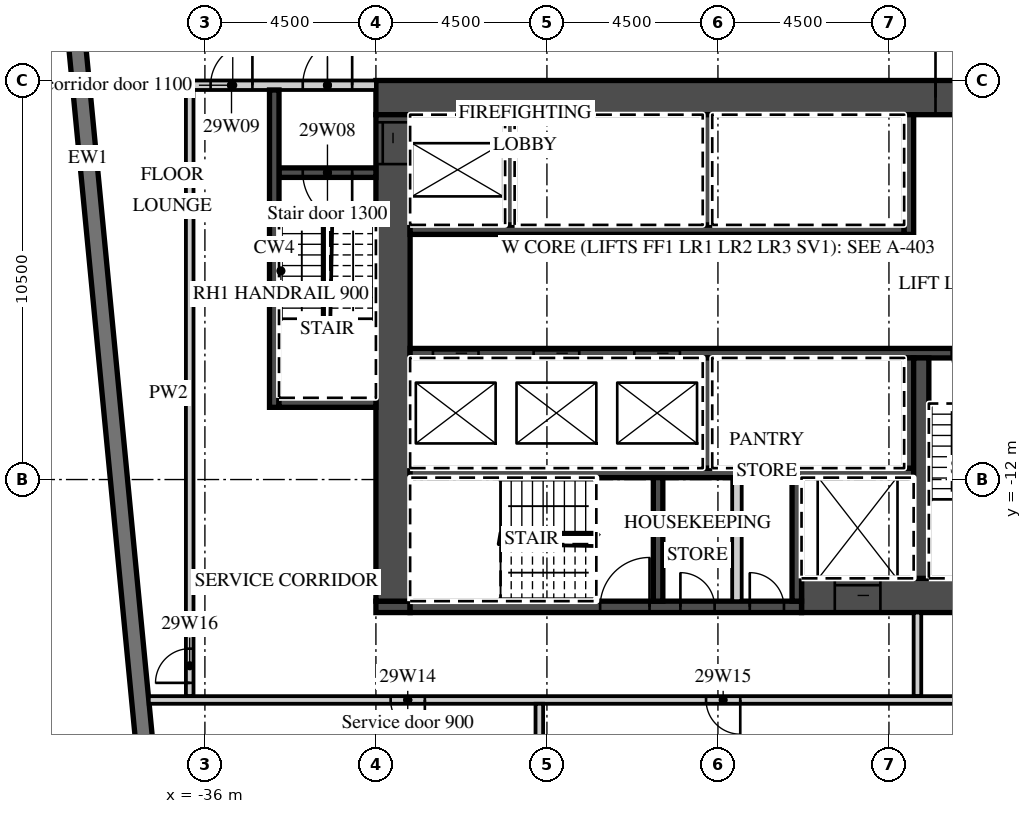
"""IFC4 building model, lengths in metres.
Left out: names, types, materials, properties, quantities, classifications, styles, units other than length and angle.
Written with IfcOpenShell. Run it as: python <this file> out.ifc"""

import sys

from ifc_helpers import new_model, si_unit, direction, frame, frame_2d, origin, place, context, subcontext, project, spatial, rectangle, extrude, element, fill, save


model = new_model("IFC4")
c1 = context("Model", 3, precision=1e-05, world=origin(), true_north=direction((0.0, 1.0)))
c2 = subcontext(c1, "Body", "Model", "MODEL_VIEW")
j1 = project(units=[si_unit("LENGTHUNIT", "METRE"), si_unit("PLANEANGLEUNIT", "RADIAN")], contexts=[c1])
p1 = place(None, origin())
s1 = spatial("IfcSite", under=j1, at=p1, CompositionType="ELEMENT")
p2 = place(p1, origin())
s2 = spatial("IfcBuilding", under=s1, at=p2, CompositionType="ELEMENT")
p3 = place(p2, frame((0.0, 0.0, 130.6)))
s3 = spatial("IfcBuildingStorey", under=s2, at=p3, CompositionType="ELEMENT", Elevation=130.6)
p4 = place(p3, frame((-40.753, 13.872, 0.0), z_axis=(0.0, 0.0, 1.0), x_axis=(0.095843327381, -0.995396431878, 0.0)))
e1 = element("IfcWall", 1, at=p4, inside=s3, PredefinedType="SOLIDWALL", context=c2, shape_type="SweptSolid", body=[
    extrude(rectangle(XDim=35.0, YDim=0.45, at=frame_2d((17.5, 0.0))), origin(), (0.0, 0.0, 1.0), 3.02),
])
p5 = place(p4, frame((4.277, 0.0, 0.45)))
e2 = element("IfcOpeningElement", 2, at=p5, cuts=e1, PredefinedType="OPENING", context=c2, shape_type="SweptSolid", body=[
    extrude(rectangle(XDim=3.3, YDim=2.25, at=frame_2d((1.65, 1.125))), frame((0.0, 0.235, 0.0), z_axis=(0.0, -1.0, 0.0), x_axis=(1.0, 0.0, 0.0)), (0.0, 0.0, 1.0), 0.47),
])
p6 = place(p4, frame((8.798, 0.0, 0.45)))
e3 = element("IfcOpeningElement", 3, at=p6, cuts=e1, PredefinedType="OPENING", context=c2, shape_type="SweptSolid", body=[
    extrude(rectangle(XDim=3.3, YDim=2.25, at=frame_2d((1.65, 1.125))), frame((0.0, 0.235, 0.0), z_axis=(0.0, -1.0, 0.0), x_axis=(1.0, 0.0, 0.0)), (0.0, 0.0, 1.0), 0.47),
])
p7 = place(p3, frame((-31.5, -1.95, 0.0), z_axis=(0.0, 0.0, 1.0), x_axis=(1.0, 0.0, 0.0)))
e4 = element("IfcWall", 4, at=p7, inside=s3, PredefinedType="SHEAR", context=c2, shape_type="SweptSolid", body=[
    extrude(rectangle(XDim=18.0, YDim=0.9, at=frame_2d((9.0, 0.0))), origin(), (0.0, 0.0, 1.0), 3.02),
])
p8 = place(p7, frame((14.725, 0.0, 0.0)))
e5 = element("IfcOpeningElement", 5, at=p8, cuts=e4, PredefinedType="OPENING", context=c2, shape_type="SweptSolid", body=[
    extrude(rectangle(XDim=1.8, YDim=2.1, at=frame_2d((0.9, 1.05))), frame((0.0, 0.46, 0.0), z_axis=(0.0, -1.0, 0.0), x_axis=(1.0, 0.0, 0.0)), (0.0, 0.0, 1.0), 0.92),
])
p9 = place(p3, frame((-20.3, -15.05, 0.0), z_axis=(0.0, 0.0, 1.0), x_axis=(1.0, 0.0, 0.0)))
e6 = element("IfcWall", 6, at=p9, inside=s3, PredefinedType="SHEAR", context=c2, shape_type="SweptSolid", body=[
    extrude(rectangle(XDim=6.8, YDim=0.9, at=frame_2d((3.4, 0.0))), origin(), (0.0, 0.0, 1.0), 3.02),
])
p10 = place(p9, frame((0.875, 0.0, 0.0)))
e7 = element("IfcOpeningElement", 7, at=p10, cuts=e6, PredefinedType="OPENING", context=c2, shape_type="SweptSolid", body=[
    extrude(rectangle(XDim=1.2, YDim=2.1, at=frame_2d((0.6, 1.05))), frame((0.0, 0.46, 0.0), z_axis=(0.0, -1.0, 0.0), x_axis=(1.0, 0.0, 0.0)), (0.0, 0.0, 1.0), 0.92),
])
p11 = place(p3, frame((-31.5, -15.35, 0.0), z_axis=(0.0, 0.0, 1.0), x_axis=(1.0, 0.0, 0.0)))
e8 = element("IfcWall", 8, at=p11, inside=s3, PredefinedType="SHEAR", context=c2, shape_type="SweptSolid", body=[
    extrude(rectangle(XDim=0.9, YDim=0.3, at=frame_2d((0.45, 0.0))), origin(), (0.0, 0.0, 1.0), 3.02),
])
p12 = place(p3, frame((-30.6, -15.35, 0.0), z_axis=(0.0, 0.0, 1.0), x_axis=(1.0, 0.0, 0.0)))
e9 = element("IfcWall", 9, at=p12, inside=s3, PredefinedType="SHEAR", context=c2, shape_type="SweptSolid", body=[
    extrude(rectangle(XDim=10.3, YDim=0.3, at=frame_2d((5.15, 0.0))), origin(), (0.0, 0.0, 1.0), 3.02),
])
p13 = place(p12, frame((5.0, 0.0, 0.0)))
e10 = element("IfcOpeningElement", 10, at=p13, cuts=e9, PredefinedType="OPENING", context=c2, shape_type="SweptSolid", body=[
    extrude(rectangle(XDim=1.3, YDim=2.1, at=frame_2d((0.65, 1.05))), frame((0.0, 0.16, 0.0), z_axis=(0.0, -1.0, 0.0), x_axis=(1.0, 0.0, 0.0)), (0.0, 0.0, 1.0), 0.32),
])
p14 = place(p12, frame((7.113, 0.0, 0.0)))
e11 = element("IfcOpeningElement", 11, at=p14, cuts=e9, PredefinedType="OPENING", context=c2, shape_type="SweptSolid", body=[
    extrude(rectangle(XDim=0.9, YDim=2.1, at=frame_2d((0.45, 1.05))), frame((0.0, 0.16, 0.0), z_axis=(0.0, -1.0, 0.0), x_axis=(1.0, 0.0, 0.0)), (0.0, 0.0, 1.0), 0.32),
])
p15 = place(p12, frame((8.938, 0.0, 0.0)))
e12 = element("IfcOpeningElement", 12, at=p15, cuts=e9, PredefinedType="OPENING", context=c2, shape_type="SweptSolid", body=[
    extrude(rectangle(XDim=0.9, YDim=2.1, at=frame_2d((0.45, 1.05))), frame((0.0, 0.16, 0.0), z_axis=(0.0, -1.0, 0.0), x_axis=(1.0, 0.0, 0.0)), (0.0, 0.0, 1.0), 0.32),
])
p16 = place(p3, frame((-31.05, -15.2, 0.0), z_axis=(0.0, 0.0, 1.0), x_axis=(0.0, 1.0, 0.0)))
e13 = element("IfcWall", 13, at=p16, inside=s3, PredefinedType="SHEAR", context=c2, shape_type="SweptSolid", body=[
    extrude(rectangle(XDim=12.8, YDim=0.9, at=frame_2d((6.4, 0.0))), origin(), (0.0, 0.0, 1.0), 3.02),
])
p17 = place(p16, frame((11.5, 0.0, 0.0)))
e14 = element("IfcOpeningElement", 14, at=p17, cuts=e13, PredefinedType="OPENING", context=c2, shape_type="SweptSolid", body=[
    extrude(rectangle(XDim=1.1, YDim=2.1, at=frame_2d((0.55, 1.05))), frame((0.0, 0.46, 0.0), z_axis=(0.0, -1.0, 0.0), x_axis=(1.0, 0.0, 0.0)), (0.0, 0.0, 1.0), 0.92),
])
p18 = place(p3, frame((-30.6, -5.425, 0.0), z_axis=(0.0, 0.0, 1.0), x_axis=(1.0, 0.0, 0.0)))
e15 = element("IfcWall", 15, at=p18, inside=s3, PredefinedType="SHEAR", context=c2, shape_type="SweptSolid", body=[
    extrude(rectangle(XDim=13.0, YDim=0.25, at=frame_2d((6.5, 0.0))), origin(), (0.0, 0.0, 1.0), 3.02),
])
p19 = place(p3, frame((-17.475, -5.55, 0.0), z_axis=(0.0, 0.0, 1.0), x_axis=(0.0, 1.0, 0.0)))
e16 = element("IfcWall", 16, at=p19, inside=s3, PredefinedType="SHEAR", context=c2, shape_type="SweptSolid", body=[
    extrude(rectangle(XDim=3.15, YDim=0.25, at=frame_2d((1.575, 0.0))), origin(), (0.0, 0.0, 1.0), 3.02),
])
for number, where, z_axis, x_axis in (
    (17, (-27.975, -5.3, 0.0), (0.0, 0.0, 1.0), (0.0, 1.0, 0.0)),
    (18, (-22.775, -5.3, 0.0), (0.0, 0.0, 1.0), (0.0, 1.0, 0.0)),
):
    element("IfcWall", number, at=place(p3, frame(where, z_axis=z_axis, x_axis=x_axis)), inside=s3, PredefinedType="SHEAR", context=c2, shape_type="SweptSolid", body=[
        extrude(rectangle(XDim=2.9, YDim=0.25, at=frame_2d((1.45, 0.0))), origin(), (0.0, 0.0, 1.0), 3.02),
    ])
p20 = place(p3, frame((-30.6, -8.675, 0.0), z_axis=(0.0, 0.0, 1.0), x_axis=(1.0, 0.0, 0.0)))
e19 = element("IfcWall", 19, at=p20, inside=s3, PredefinedType="SHEAR", context=c2, shape_type="SweptSolid", body=[
    extrude(rectangle(XDim=16.2, YDim=0.25, at=frame_2d((8.1, 0.0))), origin(), (0.0, 0.0, 1.0), 3.02),
])
p21 = place(p20, frame((0.6, 0.0, 0.0)))
e20 = element("IfcOpeningElement", 20, at=p21, cuts=e19, PredefinedType="OPENING", context=c2, shape_type="SweptSolid", body=[
    extrude(rectangle(XDim=1.2, YDim=2.1, at=frame_2d((0.6, 1.05))), frame((0.0, 0.135, 0.0), z_axis=(0.0, -1.0, 0.0), x_axis=(1.0, 0.0, 0.0)), (0.0, 0.0, 1.0), 0.27),
])
p22 = place(p20, frame((3.25, 0.0, 0.0)))
e21 = element("IfcOpeningElement", 21, at=p22, cuts=e19, PredefinedType="OPENING", context=c2, shape_type="SweptSolid", body=[
    extrude(rectangle(XDim=1.2, YDim=2.1, at=frame_2d((0.6, 1.05))), frame((0.0, 0.135, 0.0), z_axis=(0.0, -1.0, 0.0), x_axis=(1.0, 0.0, 0.0)), (0.0, 0.0, 1.0), 0.27),
])
p23 = place(p20, frame((5.9, 0.0, 0.0)))
e22 = element("IfcOpeningElement", 22, at=p23, cuts=e19, PredefinedType="OPENING", context=c2, shape_type="SweptSolid", body=[
    extrude(rectangle(XDim=1.2, YDim=2.1, at=frame_2d((0.6, 1.05))), frame((0.0, 0.135, 0.0), z_axis=(0.0, -1.0, 0.0), x_axis=(1.0, 0.0, 0.0)), (0.0, 0.0, 1.0), 0.27),
])
p24 = place(p20, frame((14.25, 0.0, 0.0)))
e23 = element("IfcOpeningElement", 23, at=p24, cuts=e19, PredefinedType="OPENING", context=c2, shape_type="SweptSolid", body=[
    extrude(rectangle(XDim=1.3, YDim=2.1, at=frame_2d((0.65, 1.05))), frame((0.0, 0.135, 0.0), z_axis=(0.0, -1.0, 0.0), x_axis=(1.0, 0.0, 0.0)), (0.0, 0.0, 1.0), 0.27),
])
p25 = place(p3, frame((-30.6, -11.825, 0.0), z_axis=(0.0, 0.0, 1.0), x_axis=(1.0, 0.0, 0.0)))
e24 = element("IfcWall", 24, at=p25, inside=s3, PredefinedType="SHEAR", context=c2, shape_type="SweptSolid", body=[
    extrude(rectangle(XDim=13.25, YDim=0.25, at=frame_2d((6.625, 0.0))), origin(), (0.0, 0.0, 1.0), 3.02),
])
for number, where, z_axis, x_axis in (
    (25, (-17.475, -11.7, 0.0), (0.0, 0.0, 1.0), (0.0, 1.0, 0.0)),
    (26, (-22.775, -11.7, 0.0), (0.0, 0.0, 1.0), (0.0, 1.0, 0.0)),
):
    element("IfcWall", number, at=place(p3, frame(where, z_axis=z_axis, x_axis=x_axis)), inside=s3, PredefinedType="SHEAR", context=c2, shape_type="SweptSolid", body=[
        extrude(rectangle(XDim=2.9, YDim=0.25, at=frame_2d((1.45, 0.0))), origin(), (0.0, 0.0, 1.0), 3.02),
    ])
p26 = place(p3, frame((-17.15, -14.6, 0.0), z_axis=(0.0, 0.0, 1.0), x_axis=(0.0, 1.0, 0.0)))
e27 = element("IfcWall", 27, at=p26, inside=s3, PredefinedType="SHEAR", context=c2, shape_type="SweptSolid", body=[
    extrude(rectangle(XDim=5.8, YDim=0.4, at=frame_2d((2.9, 0.0))), origin(), (0.0, 0.0, 1.0), 3.02),
])
for number, where, z_axis, x_axis in (
    (28, (-20.425, -15.2, 0.0), (0.0, 0.0, 1.0), (0.0, 1.0, 0.0)),
    (29, (-24.075, -15.2, 0.0), (0.0, 0.0, 1.0), (0.0, 1.0, 0.0)),
):
    element("IfcWall", number, at=place(p3, frame(where, z_axis=z_axis, x_axis=x_axis)), inside=s3, PredefinedType="SHEAR", context=c2, shape_type="SweptSolid", body=[
        extrude(rectangle(XDim=3.25, YDim=0.25, at=frame_2d((1.625, 0.0))), origin(), (0.0, 0.0, 1.0), 3.02),
    ])
p27 = place(p3, frame((-22.0, -15.2, 0.0), z_axis=(0.0, 0.0, 1.0), x_axis=(0.0, 1.0, 0.0)))
e30 = element("IfcWall", 30, at=p27, inside=s3, PredefinedType="PARTITIONING", context=c2, shape_type="SweptSolid", body=[
    extrude(rectangle(XDim=3.25, YDim=0.25, at=frame_2d((1.625, 0.0))), origin(), (0.0, 0.0, 1.0), 3.02),
])
p28 = place(p3, frame((-39.035, -1.625, 0.0), z_axis=(0.0, 0.0, 1.0), x_axis=(1.0, 0.0, 0.0)))
e31 = element("IfcWall", 31, at=p28, inside=s3, PredefinedType="PARTITIONING", context=c2, shape_type="SweptSolid", body=[
    extrude(rectangle(XDim=7.535, YDim=0.25, at=frame_2d((3.768, 0.0))), origin(), (0.0, 0.0, 1.0), 3.02),
])
p29 = place(p28, frame((5.61, 0.0, 0.0)))
e32 = element("IfcOpeningElement", 32, at=p29, cuts=e31, PredefinedType="OPENING", context=c2, shape_type="SweptSolid", body=[
    extrude(rectangle(XDim=1.3, YDim=2.1, at=frame_2d((0.65, 1.05))), frame((0.0, 0.135, 0.0), z_axis=(0.0, -1.0, 0.0), x_axis=(1.0, 0.0, 0.0)), (0.0, 0.0, 1.0), 0.27),
])
p30 = place(p28, frame((3.185, 0.0, 0.0)))
e33 = element("IfcOpeningElement", 33, at=p30, cuts=e31, PredefinedType="OPENING", context=c2, shape_type="SweptSolid", body=[
    extrude(rectangle(XDim=1.1, YDim=2.1, at=frame_2d((0.55, 1.05))), frame((0.0, 0.135, 0.0), z_axis=(0.0, -1.0, 0.0), x_axis=(1.0, 0.0, 0.0)), (0.0, 0.0, 1.0), 0.27),
])
p31 = place(p3, frame((-34.05, -3.925, 0.0), z_axis=(0.0, 0.0, 1.0), x_axis=(1.0, 0.0, 0.0)))
e34 = element("IfcWall", 34, at=p31, inside=s3, PredefinedType="SHEAR", context=c2, shape_type="SweptSolid", body=[
    extrude(rectangle(XDim=2.55, YDim=0.25, at=frame_2d((1.275, 0.0))), origin(), (0.0, 0.0, 1.0), 3.02),
])
p32 = place(p31, frame((0.625, 0.0, 0.0)))
e35 = element("IfcOpeningElement", 35, at=p32, cuts=e34, PredefinedType="OPENING", context=c2, shape_type="SweptSolid", body=[
    extrude(rectangle(XDim=1.3, YDim=2.1, at=frame_2d((0.65, 1.05))), frame((0.0, 0.135, 0.0), z_axis=(0.0, -1.0, 0.0), x_axis=(1.0, 0.0, 0.0)), (0.0, 0.0, 1.0), 0.27),
])
p33 = place(p3, frame((-34.175, -10.1, 0.0), z_axis=(0.0, 0.0, 1.0), x_axis=(0.0, 1.0, 0.0)))
e36 = element("IfcWall", 36, at=p33, inside=s3, PredefinedType="SHEAR", context=c2, shape_type="SweptSolid", body=[
    extrude(rectangle(XDim=8.35, YDim=0.25, at=frame_2d((4.175, 0.0))), origin(), (0.0, 0.0, 1.0), 3.02),
])
p34 = place(p3, frame((-34.05, -9.975, 0.0), z_axis=(0.0, 0.0, 1.0), x_axis=(1.0, 0.0, 0.0)))
e37 = element("IfcWall", 37, at=p34, inside=s3, PredefinedType="SHEAR", context=c2, shape_type="SweptSolid", body=[
    extrude(rectangle(XDim=2.55, YDim=0.25, at=frame_2d((1.275, 0.0))), origin(), (0.0, 0.0, 1.0), 3.02),
])
p35 = place(p3, frame((-17.25, -17.7, 0.0), z_axis=(0.0, 0.0, 1.0), x_axis=(0.0, 1.0, 0.0)))
e38 = element("IfcWall", 38, at=p35, inside=s3, PredefinedType="PARTITIONING", context=c2, shape_type="SweptSolid", body=[
    extrude(rectangle(XDim=2.2, YDim=0.2, at=frame_2d((1.1, 0.0))), origin(), (0.0, 0.0, 1.0), 3.02),
])
p36 = place(p3, frame((-36.4, -17.7, 0.0), z_axis=(0.0, 0.0, 1.0), x_axis=(0.0, 1.0, 0.0)))
e39 = element("IfcWall", 39, at=p36, inside=s3, PredefinedType="PARTITIONING", context=c2, shape_type="SweptSolid", body=[
    extrude(rectangle(XDim=15.95, YDim=0.2, at=frame_2d((7.975, 0.0))), origin(), (0.0, 0.0, 1.0), 3.02),
])
p37 = place(p36, frame((0.35, 0.0, 0.0)))
e40 = element("IfcOpeningElement", 40, at=p37, cuts=e39, PredefinedType="OPENING", context=c2, shape_type="SweptSolid", body=[
    extrude(rectangle(XDim=0.9, YDim=2.1, at=frame_2d((0.45, 1.05))), frame((0.0, 0.11, 0.0), z_axis=(0.0, -1.0, 0.0), x_axis=(1.0, 0.0, 0.0)), (0.0, 0.0, 1.0), 0.22),
])
p38 = place(p3, frame((-37.477, -17.8, 0.0), z_axis=(0.0, 0.0, 1.0), x_axis=(1.0, 0.0, 0.0)))
e41 = element("IfcWall", 41, at=p38, inside=s3, PredefinedType="PARTITIONING", context=c2, shape_type="SweptSolid", body=[
    extrude(rectangle(XDim=23.877, YDim=0.2, at=frame_2d((11.938, 0.0))), origin(), (0.0, 0.0, 1.0), 3.02),
])
p39 = place(p38, frame((6.365, 0.0, 0.0)))
e42 = element("IfcOpeningElement", 42, at=p39, cuts=e41, PredefinedType="OPENING", context=c2, shape_type="SweptSolid", body=[
    extrude(rectangle(XDim=0.9, YDim=2.1, at=frame_2d((0.45, 1.05))), frame((0.0, 0.11, 0.0), z_axis=(0.0, -1.0, 0.0), x_axis=(1.0, 0.0, 0.0)), (0.0, 0.0, 1.0), 0.22),
])
p40 = place(p38, frame((14.665, 0.0, 0.0)))
e43 = element("IfcOpeningElement", 43, at=p40, cuts=e41, PredefinedType="OPENING", context=c2, shape_type="SweptSolid", body=[
    extrude(rectangle(XDim=0.9, YDim=2.1, at=frame_2d((0.45, 1.05))), frame((0.0, 0.11, 0.0), z_axis=(0.0, -1.0, 0.0), x_axis=(1.0, 0.0, 0.0)), (0.0, 0.0, 1.0), 0.22),
])
p41 = place(p3, frame((-27.2, -23.552, 0.0), z_axis=(0.0, 0.0, 1.0), x_axis=(0.0, 1.0, 0.0)))
e44 = element("IfcWall", 44, at=p41, inside=s3, PredefinedType="PARTITIONING", context=c2, shape_type="SweptSolid", body=[
    extrude(rectangle(XDim=5.653, YDim=0.2, at=frame_2d((2.826, 0.0))), origin(), (0.0, 0.0, 1.0), 3.02),
])
p42 = place(p21, origin())
e45 = element("IfcDoor", 45, at=p42, inside=s3, OperationType="SLIDING_TO_LEFT", PredefinedType="DOOR", context=c2, shape_type="SweptSolid", body=[
    extrude(rectangle(XDim=1.2, YDim=2.1, at=frame_2d((0.6, 1.05))), frame((0.0, 0.025, 0.0), z_axis=(0.0, -1.0, 0.0), x_axis=(1.0, 0.0, 0.0)), (0.0, 0.0, 1.0), 0.05),
])
fill(e20, e45)
p43 = place(p22, origin())
e46 = element("IfcDoor", 46, at=p43, inside=s3, OperationType="SLIDING_TO_RIGHT", PredefinedType="DOOR", context=c2, shape_type="SweptSolid", body=[
    extrude(rectangle(XDim=1.2, YDim=2.1, at=frame_2d((0.6, 1.05))), frame((0.0, 0.025, 0.0), z_axis=(0.0, -1.0, 0.0), x_axis=(1.0, 0.0, 0.0)), (0.0, 0.0, 1.0), 0.05),
])
fill(e21, e46)
p44 = place(p23, origin())
e47 = element("IfcDoor", 47, at=p44, inside=s3, OperationType="SLIDING_TO_RIGHT", PredefinedType="DOOR", context=c2, shape_type="SweptSolid", body=[
    extrude(rectangle(XDim=1.2, YDim=2.1, at=frame_2d((0.6, 1.05))), frame((0.0, 0.025, 0.0), z_axis=(0.0, -1.0, 0.0), x_axis=(1.0, 0.0, 0.0)), (0.0, 0.0, 1.0), 0.05),
])
fill(e22, e47)
p45 = place(p10, origin())
e48 = element("IfcDoor", 48, at=p45, inside=s3, OperationType="SLIDING_TO_LEFT", PredefinedType="DOOR", context=c2, shape_type="SweptSolid", body=[
    extrude(rectangle(XDim=1.2, YDim=2.1, at=frame_2d((0.6, 1.05))), frame((0.0, 0.025, 0.0), z_axis=(0.0, -1.0, 0.0), x_axis=(1.0, 0.0, 0.0)), (0.0, 0.0, 1.0), 0.05),
])
fill(e7, e48)
p46 = place(p17, origin())
e49 = element("IfcDoor", 49, at=p46, inside=s3, OperationType="SLIDING_TO_RIGHT", PredefinedType="DOOR", context=c2, shape_type="SweptSolid", body=[
    extrude(rectangle(XDim=1.1, YDim=2.1, at=frame_2d((0.55, 1.05))), frame((0.0, 0.025, 0.0), z_axis=(0.0, -1.0, 0.0), x_axis=(1.0, 0.0, 0.0)), (0.0, 0.0, 1.0), 0.05),
])
fill(e14, e49)
p47 = place(p8, origin())
e50 = element("IfcDoor", 50, at=p47, inside=s3, OperationType="DOUBLE_DOOR_DOUBLE_SWING", PredefinedType="DOOR", context=c2, shape_type="SweptSolid", body=[
    extrude(rectangle(XDim=1.8, YDim=2.1, at=frame_2d((0.9, 1.05))), frame((0.0, 0.025, 0.0), z_axis=(0.0, -1.0, 0.0), x_axis=(1.0, 0.0, 0.0)), (0.0, 0.0, 1.0), 0.05),
])
fill(e5, e50)
p48 = place(p29, origin())
e51 = element("IfcDoor", 51, at=p48, inside=s3, OperationType="SINGLE_SWING_RIGHT", PredefinedType="DOOR", context=c2, shape_type="SweptSolid", body=[
    extrude(rectangle(XDim=1.3, YDim=2.1, at=frame_2d((0.65, 1.05))), frame((0.0, 0.025, 0.0), z_axis=(0.0, -1.0, 0.0), x_axis=(1.0, 0.0, 0.0)), (0.0, 0.0, 1.0), 0.05),
])
fill(e32, e51)
p49 = place(p32, origin())
e52 = element("IfcDoor", 52, at=p49, inside=s3, OperationType="SINGLE_SWING_RIGHT", PredefinedType="DOOR", context=c2, shape_type="SweptSolid", body=[
    extrude(rectangle(XDim=1.3, YDim=2.1, at=frame_2d((0.65, 1.05))), frame((0.0, 0.025, 0.0), z_axis=(0.0, -1.0, 0.0), x_axis=(1.0, 0.0, 0.0)), (0.0, 0.0, 1.0), 0.05),
])
fill(e35, e52)
p50 = place(p30, origin())
e53 = element("IfcDoor", 53, at=p50, inside=s3, OperationType="SINGLE_SWING_RIGHT", PredefinedType="DOOR", context=c2, shape_type="SweptSolid", body=[
    extrude(rectangle(XDim=1.1, YDim=2.1, at=frame_2d((0.55, 1.05))), frame((0.0, 0.025, 0.0), z_axis=(0.0, -1.0, 0.0), x_axis=(1.0, 0.0, 0.0)), (0.0, 0.0, 1.0), 0.05),
])
fill(e33, e53)
p51 = place(p24, origin())
e54 = element("IfcDoor", 54, at=p51, inside=s3, OperationType="SINGLE_SWING_RIGHT", PredefinedType="DOOR", context=c2, shape_type="SweptSolid", body=[
    extrude(rectangle(XDim=1.3, YDim=2.1, at=frame_2d((0.65, 1.05))), frame((0.0, 0.025, 0.0), z_axis=(0.0, -1.0, 0.0), x_axis=(1.0, 0.0, 0.0)), (0.0, 0.0, 1.0), 0.05),
])
fill(e23, e54)
p52 = place(p13, origin())
e55 = element("IfcDoor", 55, at=p52, inside=s3, OperationType="SINGLE_SWING_RIGHT", PredefinedType="DOOR", context=c2, shape_type="SweptSolid", body=[
    extrude(rectangle(XDim=1.3, YDim=2.1, at=frame_2d((0.65, 1.05))), frame((0.0, 0.025, 0.0), z_axis=(0.0, -1.0, 0.0), x_axis=(1.0, 0.0, 0.0)), (0.0, 0.0, 1.0), 0.05),
])
fill(e10, e55)
p53 = place(p14, origin())
e56 = element("IfcDoor", 56, at=p53, inside=s3, OperationType="SINGLE_SWING_LEFT", PredefinedType="DOOR", context=c2, shape_type="SweptSolid", body=[
    extrude(rectangle(XDim=0.9, YDim=2.1, at=frame_2d((0.45, 1.05))), frame((0.0, 0.025, 0.0), z_axis=(0.0, -1.0, 0.0), x_axis=(1.0, 0.0, 0.0)), (0.0, 0.0, 1.0), 0.05),
])
fill(e11, e56)
p54 = place(p15, origin())
e57 = element("IfcDoor", 57, at=p54, inside=s3, OperationType="SINGLE_SWING_LEFT", PredefinedType="DOOR", context=c2, shape_type="SweptSolid", body=[
    extrude(rectangle(XDim=0.9, YDim=2.1, at=frame_2d((0.45, 1.05))), frame((0.0, 0.025, 0.0), z_axis=(0.0, -1.0, 0.0), x_axis=(1.0, 0.0, 0.0)), (0.0, 0.0, 1.0), 0.05),
])
fill(e12, e57)
p55 = place(p39, origin())
e58 = element("IfcDoor", 58, at=p55, inside=s3, OperationType="SINGLE_SWING_RIGHT", PredefinedType="DOOR", context=c2, shape_type="SweptSolid", body=[
    extrude(rectangle(XDim=0.9, YDim=2.1, at=frame_2d((0.45, 1.05))), frame((0.0, 0.025, 0.0), z_axis=(0.0, -1.0, 0.0), x_axis=(1.0, 0.0, 0.0)), (0.0, 0.0, 1.0), 0.05),
])
fill(e42, e58)
p56 = place(p40, origin())
e59 = element("IfcDoor", 59, at=p56, inside=s3, OperationType="SINGLE_SWING_RIGHT", PredefinedType="DOOR", context=c2, shape_type="SweptSolid", body=[
    extrude(rectangle(XDim=0.9, YDim=2.1, at=frame_2d((0.45, 1.05))), frame((0.0, 0.025, 0.0), z_axis=(0.0, -1.0, 0.0), x_axis=(1.0, 0.0, 0.0)), (0.0, 0.0, 1.0), 0.05),
])
fill(e43, e59)
p57 = place(p37, origin())
e60 = element("IfcDoor", 60, at=p57, inside=s3, OperationType="SINGLE_SWING_LEFT", PredefinedType="DOOR", context=c2, shape_type="SweptSolid", body=[
    extrude(rectangle(XDim=0.9, YDim=2.1, at=frame_2d((0.45, 1.05))), frame((0.0, 0.025, 0.0), z_axis=(0.0, -1.0, 0.0), x_axis=(1.0, 0.0, 0.0)), (0.0, 0.0, 1.0), 0.05),
])
fill(e40, e60)
save(model, sys.argv[1])
